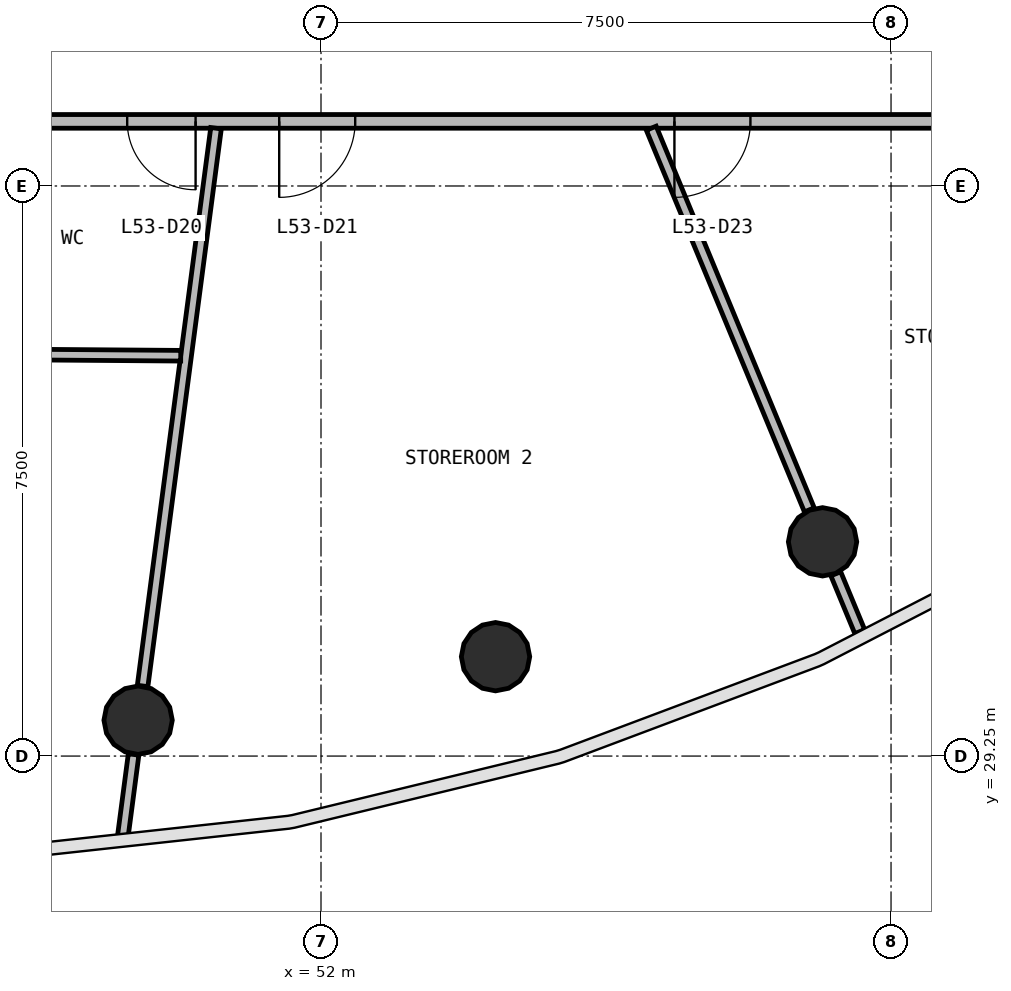
"""IFC4 building model, lengths in metres.
Left out: names, types, materials, properties, quantities, classifications, styles, units other than length and angle.
Written with IfcOpenShell. Run it as: python <this file> out.ifc"""

import sys

from ifc_helpers import new_model, si_unit, direction, frame, frame_2d, origin, origin_2d, place, context, subcontext, project, spatial, rectangle, circle, extrude, source, transform, mapped, element, fill, save


model = new_model("IFC4")
c1 = context("Model", 3, precision=1e-05, world=origin(), true_north=direction((0.0, 1.0)))
c2 = subcontext(c1, "Body", "Model", "MODEL_VIEW")
j1 = project(units=[si_unit("LENGTHUNIT", "METRE"), si_unit("PLANEANGLEUNIT", "RADIAN")], contexts=[c1])
p1 = place(None, origin())
s1 = spatial("IfcSite", under=j1, at=p1, CompositionType="ELEMENT")
p2 = place(p1, origin())
s2 = spatial("IfcBuilding", under=s1, at=p2, CompositionType="ELEMENT")
p3 = place(p2, frame((0.0, 0.0, 218.9)))
s3 = spatial("IfcBuildingStorey", under=s2, at=p3, CompositionType="ELEMENT", Elevation=218.9)
m1 = source(origin(), c2, "Body", "SweptSolid", [
    extrude(circle(Radius=0.45, at=origin_2d()), origin(), (0.0, 0.0, 1.0), 3.9),
])
for number, where, z_axis, x_axis in (
    (1, (49.594, 29.722, 0.0), (0.0, 0.0, 1.0), (1.0, 0.0, 0.0)),
    (2, (54.296, 30.558, 0.0), (0.0, 0.0, 1.0), (1.0, 0.0, 0.0)),
    (3, (58.599, 32.069, 0.0), (0.0, 0.0, 1.0), (1.0, 0.0, 0.0)),
):
    element("IfcColumn", number, at=place(p3, frame(where, z_axis=z_axis, x_axis=x_axis)), inside=s3, PredefinedType="COLUMN", context=c2, shape_type="MappedRepresentation", body=[
        mapped(m1, transform((0.0, 0.0, 0.0), scale=1.0)),
    ])
p4 = place(p3, frame((63.4, 37.6, 0.0), z_axis=(0.0, 0.0, 1.0), x_axis=(-1.0, 0.0, 0.0)))
e4 = element("IfcWall", 4, at=p4, inside=s3, PredefinedType="PARTITIONING", context=c2, shape_type="SweptSolid", body=[
    extrude(rectangle(XDim=22.8, YDim=0.18, at=frame_2d((11.4, 0.0))), origin(), (0.0, 0.0, 1.0), 2.88),
])
p5 = place(p4, frame((16.05, 0.0, 0.0)))
e5 = element("IfcOpeningElement", 5, at=p5, cuts=e4, PredefinedType="OPENING", context=c2, shape_type="SweptSolid", body=[
    extrude(rectangle(XDim=0.9, YDim=2.1, at=frame_2d((0.45, 1.05))), frame((0.0, 0.1, 0.0), z_axis=(0.0, -1.0, 0.0), x_axis=(1.0, 0.0, 0.0)), (0.0, 0.0, 1.0), 0.2),
])
p6 = place(p4, frame((13.05, 0.0, 0.0)))
e6 = element("IfcOpeningElement", 6, at=p6, cuts=e4, PredefinedType="OPENING", context=c2, shape_type="SweptSolid", body=[
    extrude(rectangle(XDim=0.9, YDim=2.1, at=frame_2d((0.45, 1.05))), frame((0.0, 0.1, 0.0), z_axis=(0.0, -1.0, 0.0), x_axis=(1.0, 0.0, 0.0)), (0.0, 0.0, 1.0), 0.2),
])
p7 = place(p4, frame((10.95, 0.0, 0.0)))
e7 = element("IfcOpeningElement", 7, at=p7, cuts=e4, PredefinedType="OPENING", context=c2, shape_type="SweptSolid", body=[
    extrude(rectangle(XDim=1.0, YDim=2.1, at=frame_2d((0.5, 1.05))), frame((0.0, 0.1, 0.0), z_axis=(0.0, -1.0, 0.0), x_axis=(1.0, 0.0, 0.0)), (0.0, 0.0, 1.0), 0.2),
])
p8 = place(p4, frame((5.75, 0.0, 0.0)))
e8 = element("IfcOpeningElement", 8, at=p8, cuts=e4, PredefinedType="OPENING", context=c2, shape_type="SweptSolid", body=[
    extrude(rectangle(XDim=1.0, YDim=2.1, at=frame_2d((0.5, 1.05))), frame((0.0, 0.1, 0.0), z_axis=(0.0, -1.0, 0.0), x_axis=(1.0, 0.0, 0.0)), (0.0, 0.0, 1.0), 0.2),
])
p9 = place(p3, frame((49.653, 30.172, 0.0), z_axis=(0.0, 0.0, 1.0), x_axis=(0.130532164535, 0.991444075085, 0.0)))
e9 = element("IfcWall", 9, at=p9, inside=s3, PredefinedType="PARTITIONING", context=c2, shape_type="SweptSolid", body=[
    extrude(rectangle(XDim=7.401, YDim=0.14, at=frame_2d((3.7, 0.0))), origin(), (0.0, 0.0, 1.0), 2.88),
])
p10 = place(p3, frame((56.345, 37.51, 0.0), z_axis=(0.0, 0.0, 1.0), x_axis=(0.382655972885, -0.923890906122, 0.0)))
e10 = element("IfcWall", 10, at=p10, inside=s3, PredefinedType="PARTITIONING", context=c2, shape_type="SweptSolid", body=[
    extrude(rectangle(XDim=5.435, YDim=0.14, at=frame_2d((2.717, 0.0))), origin(), (0.0, 0.0, 1.0), 2.88),
])
p11 = place(p3, frame((46.457, 34.545, 0.0), z_axis=(0.0, 0.0, 1.0), x_axis=(0.999971172409, -0.007593046208, 0.0)))
e11 = element("IfcWall", 11, at=p11, inside=s3, PredefinedType="PARTITIONING", context=c2, shape_type="SweptSolid", body=[
    extrude(rectangle(XDim=3.698, YDim=0.14, at=frame_2d((1.849, 0.0))), origin(), (0.0, 0.0, 1.0), 2.88),
])
p12 = place(p3, frame((49.393, 28.194, 0.0), z_axis=(0.0, 0.0, 1.0), x_axis=(0.130338250237, 0.991469586284, 0.0)))
e12 = element("IfcWall", 12, at=p12, inside=s3, PredefinedType="PARTITIONING", context=c2, shape_type="SweptSolid", body=[
    extrude(rectangle(XDim=1.086, YDim=0.14, at=frame_2d((0.543, 0.0))), origin(), (0.0, 0.0, 1.0), 2.88),
])
p13 = place(p3, frame((58.773, 31.648, 0.0), z_axis=(0.0, 0.0, 1.0), x_axis=(0.382657203083, -0.923890396599, 0.0)))
e13 = element("IfcWall", 13, at=p13, inside=s3, PredefinedType="PARTITIONING", context=c2, shape_type="SweptSolid", body=[
    extrude(rectangle(XDim=0.824, YDim=0.14, at=frame_2d((0.412, 0.0))), origin(), (0.0, 0.0, 1.0), 2.88),
])
m2 = source(origin(), c2, "Body", "SweptSolid", [
    extrude(rectangle(XDim=0.9, YDim=2.1, at=frame_2d((0.45, 1.05))), frame((0.0, 0.025, 0.0), z_axis=(0.0, -1.0, 0.0), x_axis=(1.0, 0.0, 0.0)), (0.0, 0.0, 1.0), 0.05),
])
p14 = place(p6, origin())
e14 = element("IfcDoor", 14, at=p14, inside=s3, OperationType="SINGLE_SWING_LEFT", PredefinedType="DOOR", context=c2, shape_type="MappedRepresentation", body=[
    mapped(m2, transform((0.0, 0.0, 0.0), scale=1.0)),
])
fill(e6, e14)
m3 = source(origin(), c2, "Body", "SweptSolid", [
    extrude(rectangle(XDim=1.0, YDim=2.1, at=frame_2d((0.5, 1.05))), frame((0.0, 0.025, 0.0), z_axis=(0.0, -1.0, 0.0), x_axis=(1.0, 0.0, 0.0)), (0.0, 0.0, 1.0), 0.05),
])
p15 = place(p7, origin())
e15 = element("IfcDoor", 15, at=p15, inside=s3, OperationType="SINGLE_SWING_RIGHT", PredefinedType="DOOR", context=c2, shape_type="MappedRepresentation", body=[
    mapped(m3, transform((0.0, 0.0, 0.0), scale=1.0)),
])
fill(e7, e15)
p16 = place(p8, origin())
e16 = element("IfcDoor", 16, at=p16, inside=s3, OperationType="SINGLE_SWING_RIGHT", PredefinedType="DOOR", context=c2, shape_type="MappedRepresentation", body=[
    mapped(m3, transform((0.0, 0.0, 0.0), scale=1.0)),
])
fill(e8, e16)
save(model, sys.argv[1])
